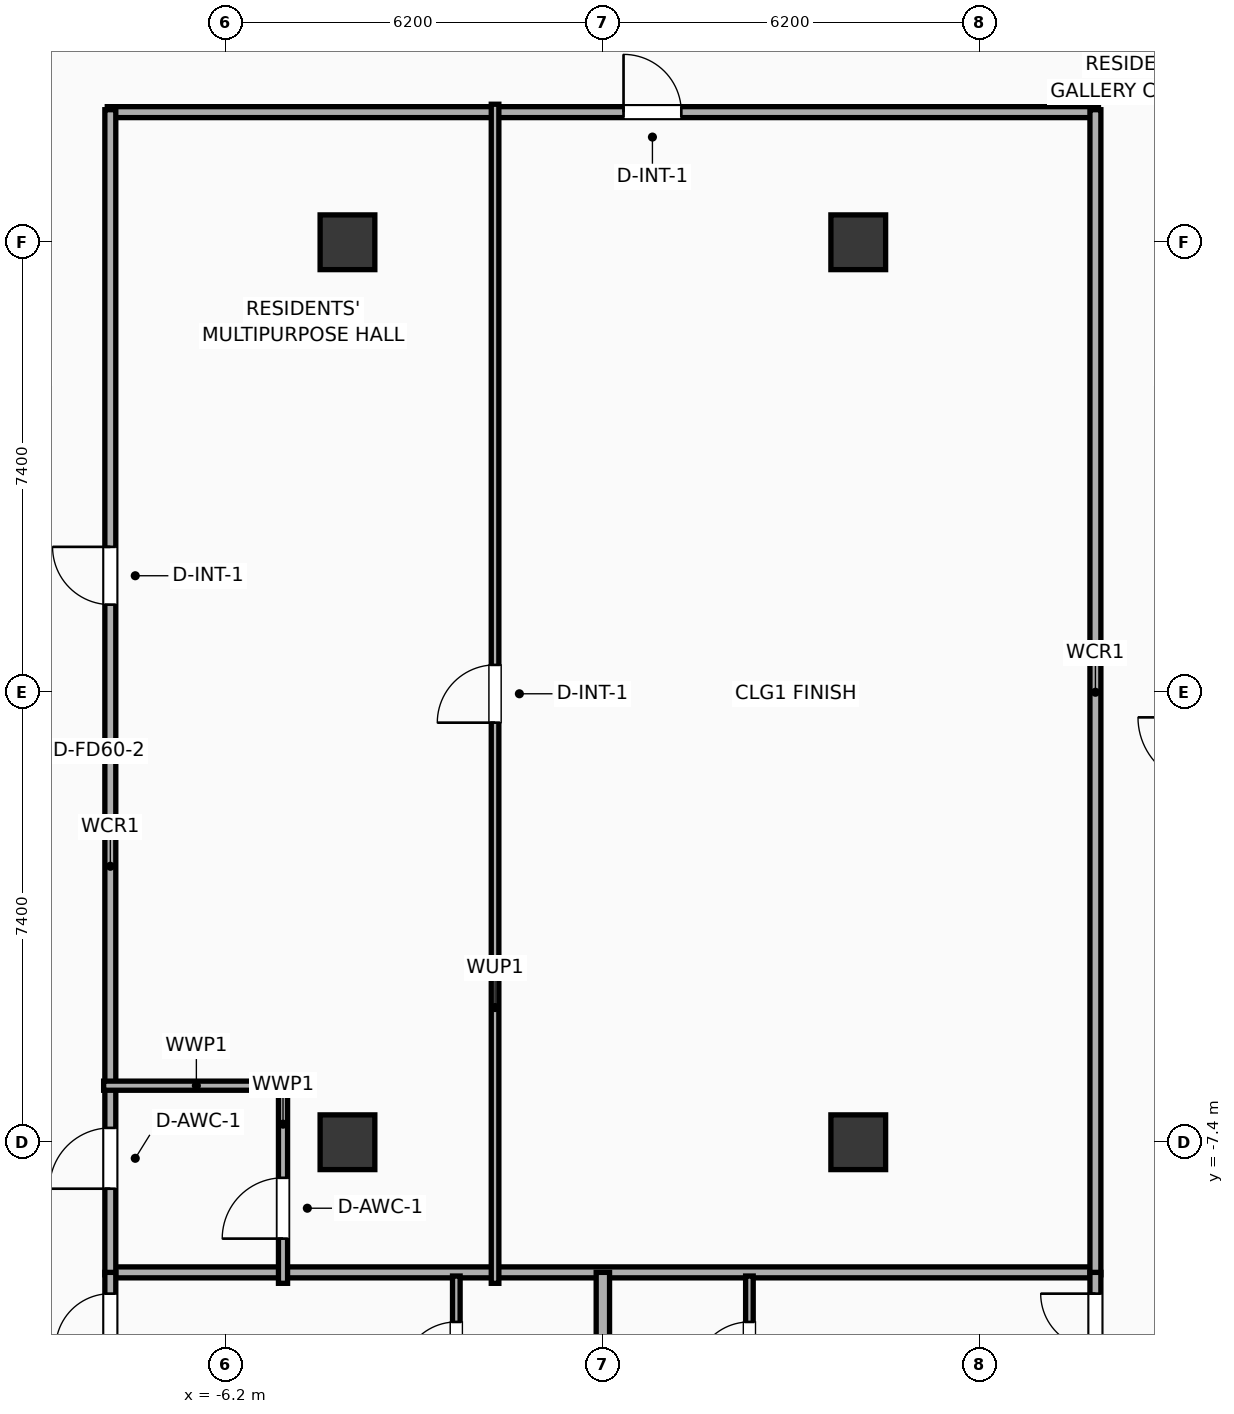
"""IFC4 building model, lengths in metres.
Left out: names, types, materials, properties, quantities, classifications, styles, units other than length and angle.
Written with IfcOpenShell. Run it as: python <this file> out.ifc"""

import sys

from ifc_helpers import new_model, si_unit, direction, frame, frame_2d, origin, origin_2d, place, context, subcontext, project, spatial, rectangle, extrude, element, fill, save


model = new_model("IFC4")
c1 = context("Model", 3, precision=1e-05, world=origin(), true_north=direction((0.0, 1.0)))
c2 = subcontext(c1, "Body", "Model", "MODEL_VIEW")
j1 = project(units=[si_unit("LENGTHUNIT", "METRE"), si_unit("PLANEANGLEUNIT", "RADIAN")], contexts=[c1])
p1 = place(None, origin())
s1 = spatial("IfcSite", under=j1, at=p1, CompositionType="ELEMENT")
p2 = place(p1, origin())
s2 = spatial("IfcBuilding", under=s1, at=p2, CompositionType="ELEMENT")
p3 = place(p2, frame((0.0, 0.0, 231.4)))
s3 = spatial("IfcBuildingStorey", under=s2, at=p3, CompositionType="ELEMENT", Elevation=231.4)
for number, where, z_axis, x_axis in (
    (1, (-4.2, -7.4, 0.0), (0.0, 0.0, 1.0), (1.0, 0.0, 0.0)),
    (2, (-4.2, 7.4, 0.0), (0.0, 0.0, 1.0), (1.0, 0.0, 0.0)),
    (3, (4.2, -7.4, 0.0), (0.0, 0.0, 1.0), (1.0, 0.0, 0.0)),
    (4, (4.2, 7.4, 0.0), (0.0, 0.0, 1.0), (1.0, 0.0, 0.0)),
):
    element("IfcColumn", number, at=place(p3, frame(where, z_axis=z_axis, x_axis=x_axis)), inside=s3, PredefinedType="COLUMN", context=c2, shape_type="SweptSolid", body=[
        extrude(rectangle(XDim=0.9, YDim=0.9, at=origin_2d()), origin(), (0.0, 0.0, 1.0), 3.9),
    ])
p4 = place(p3, frame((-8.15, 9.54, 0.0), z_axis=(0.0, 0.0, 1.0), x_axis=(1.0, 0.0, 0.0)))
e5 = element("IfcWall", 5, at=p4, inside=s3, PredefinedType="PARTITIONING", context=c2, shape_type="SweptSolid", body=[
    extrude(rectangle(XDim=16.3, YDim=0.18, at=frame_2d((8.15, 0.0))), origin(), (0.0, 0.0, 1.0), 3.65),
])
p5 = place(p4, frame((8.49, 0.0, 0.0)))
e6 = element("IfcOpeningElement", 6, at=p5, cuts=e5, PredefinedType="OPENING", context=c2, shape_type="SweptSolid", body=[
    extrude(rectangle(XDim=0.95, YDim=2.05, at=frame_2d((0.475, 1.025))), frame((0.0, 0.1, 0.0), z_axis=(0.0, -1.0, 0.0), x_axis=(1.0, 0.0, 0.0)), (0.0, 0.0, 1.0), 0.2),
])
p6 = place(p3, frame((-8.15, -9.54, 0.0), z_axis=(0.0, 0.0, 1.0), x_axis=(1.0, 0.0, 0.0)))
e7 = element("IfcWall", 7, at=p6, inside=s3, PredefinedType="PARTITIONING", context=c2, shape_type="SweptSolid", body=[
    extrude(rectangle(XDim=16.3, YDim=0.18, at=frame_2d((8.15, 0.0))), origin(), (0.0, 0.0, 1.0), 3.65),
])
p7 = place(p3, frame((-8.1, -9.58, 0.0), z_axis=(0.0, 0.0, 1.0), x_axis=(0.0, 1.0, 0.0)))
e8 = element("IfcWall", 8, at=p7, inside=s3, PredefinedType="PARTITIONING", context=c2, shape_type="SweptSolid", body=[
    extrude(rectangle(XDim=19.16, YDim=0.18, at=frame_2d((9.58, 0.0))), origin(), (0.0, 0.0, 1.0), 3.65),
])
p8 = place(p7, frame((1.416, 0.0, 0.0)))
e9 = element("IfcOpeningElement", 9, at=p8, cuts=e8, PredefinedType="OPENING", context=c2, shape_type="SweptSolid", body=[
    extrude(rectangle(XDim=1.0, YDim=2.05, at=frame_2d((0.5, 1.025))), frame((0.0, 0.1, 0.0), z_axis=(0.0, -1.0, 0.0), x_axis=(1.0, 0.0, 0.0)), (0.0, 0.0, 1.0), 0.2),
])
p9 = place(p7, frame((11.021, 0.0, 0.0)))
e10 = element("IfcOpeningElement", 10, at=p9, cuts=e8, PredefinedType="OPENING", context=c2, shape_type="SweptSolid", body=[
    extrude(rectangle(XDim=0.95, YDim=2.05, at=frame_2d((0.475, 1.025))), frame((0.0, 0.1, 0.0), z_axis=(0.0, -1.0, 0.0), x_axis=(1.0, 0.0, 0.0)), (0.0, 0.0, 1.0), 0.2),
])
p10 = place(p3, frame((8.1, -9.58, 0.0), z_axis=(0.0, 0.0, 1.0), x_axis=(0.0, 1.0, 0.0)))
e11 = element("IfcWall", 11, at=p10, inside=s3, PredefinedType="PARTITIONING", context=c2, shape_type="SweptSolid", body=[
    extrude(rectangle(XDim=19.16, YDim=0.18, at=frame_2d((9.58, 0.0))), origin(), (0.0, 0.0, 1.0), 3.65),
])
p11 = place(p3, frame((-5.26, -9.72, 0.0), z_axis=(0.0, 0.0, 1.0), x_axis=(0.0, 1.0, 0.0)))
e12 = element("IfcWall", 12, at=p11, inside=s3, PredefinedType="PLUMBINGWALL", context=c2, shape_type="SweptSolid", body=[
    extrude(rectangle(XDim=3.35, YDim=0.15, at=frame_2d((1.675, 0.0))), origin(), (0.0, 0.0, 1.0), 3.65),
])
p12 = place(p11, frame((0.735, 0.0, 0.0)))
e13 = element("IfcOpeningElement", 13, at=p12, cuts=e12, PredefinedType="OPENING", context=c2, shape_type="SweptSolid", body=[
    extrude(rectangle(XDim=1.0, YDim=2.05, at=frame_2d((0.5, 1.025))), frame((0.0, 0.085, 0.0), z_axis=(0.0, -1.0, 0.0), x_axis=(1.0, 0.0, 0.0)), (0.0, 0.0, 1.0), 0.17),
])
p13 = place(p3, frame((-8.21, -6.47, 0.0), z_axis=(0.0, 0.0, 1.0), x_axis=(1.0, 0.0, 0.0)))
e14 = element("IfcWall", 14, at=p13, inside=s3, PredefinedType="PLUMBINGWALL", context=c2, shape_type="SweptSolid", body=[
    extrude(rectangle(XDim=3.05, YDim=0.15, at=frame_2d((1.525, 0.0))), origin(), (0.0, 0.0, 1.0), 3.65),
])
p14 = place(p3, frame((-1.773, -9.72, 0.0), z_axis=(0.0, 0.0, 1.0), x_axis=(0.0, 1.0, 0.0)))
e15 = element("IfcWall", 15, at=p14, inside=s3, PredefinedType="PARTITIONING", context=c2, shape_type="SweptSolid", body=[
    extrude(rectangle(XDim=19.39, YDim=0.125, at=frame_2d((9.695, 0.0))), origin(), (0.0, 0.0, 1.0), 3.65),
])
p15 = place(p14, frame((9.22, 0.0, 0.0)))
e16 = element("IfcOpeningElement", 16, at=p15, cuts=e15, PredefinedType="OPENING", context=c2, shape_type="SweptSolid", body=[
    extrude(rectangle(XDim=0.95, YDim=2.05, at=frame_2d((0.475, 1.025))), frame((0.0, 0.073, 0.0), z_axis=(0.0, -1.0, 0.0), x_axis=(1.0, 0.0, 0.0)), (0.0, 0.0, 1.0), 0.145),
])
p16 = place(p3, frame((-2.41, -12.01, 0.0), z_axis=(0.0, 0.0, 1.0), x_axis=(0.0, 1.0, 0.0)))
e17 = element("IfcWall", 17, at=p16, inside=s3, PredefinedType="PARTITIONING", context=c2, shape_type="SweptSolid", body=[
    extrude(rectangle(XDim=2.41, YDim=0.125, at=frame_2d((1.205, 0.0))), origin(), (0.0, 0.0, 1.0), 3.65),
])
p17 = place(p16, frame((0.755, 0.0, 0.0)))
e18 = element("IfcOpeningElement", 18, at=p17, cuts=e17, PredefinedType="OPENING", context=c2, shape_type="SweptSolid", body=[
    extrude(rectangle(XDim=0.9, YDim=2.05, at=frame_2d((0.45, 1.025))), frame((0.0, 0.073, 0.0), z_axis=(0.0, -1.0, 0.0), x_axis=(1.0, 0.0, 0.0)), (0.0, 0.0, 1.0), 0.145),
])
p18 = place(p3, frame((-8.1, -18.83, 0.0), z_axis=(0.0, 0.0, 1.0), x_axis=(0.0, 1.0, 0.0)))
e19 = element("IfcWall", 19, at=p18, inside=s3, PredefinedType="PARTITIONING", context=c2, shape_type="SweptSolid", body=[
    extrude(rectangle(XDim=9.29, YDim=0.18, at=frame_2d((4.645, 0.0))), origin(), (0.0, 0.0, 1.0), 3.65),
])
p19 = place(p18, frame((8.04, 0.0, 0.0)))
e20 = element("IfcOpeningElement", 20, at=p19, cuts=e19, PredefinedType="OPENING", context=c2, shape_type="SweptSolid", body=[
    extrude(rectangle(XDim=0.9, YDim=2.05, at=frame_2d((0.45, 1.025))), frame((0.0, 0.1, 0.0), z_axis=(0.0, -1.0, 0.0), x_axis=(1.0, 0.0, 0.0)), (0.0, 0.0, 1.0), 0.2),
])
p20 = place(p3, frame((2.41, -12.01, 0.0), z_axis=(0.0, 0.0, 1.0), x_axis=(0.0, 1.0, 0.0)))
e21 = element("IfcWall", 21, at=p20, inside=s3, PredefinedType="PARTITIONING", context=c2, shape_type="SweptSolid", body=[
    extrude(rectangle(XDim=2.41, YDim=0.125, at=frame_2d((1.205, 0.0))), origin(), (0.0, 0.0, 1.0), 3.65),
])
p21 = place(p20, frame((0.755, 0.0, 0.0)))
e22 = element("IfcOpeningElement", 22, at=p21, cuts=e21, PredefinedType="OPENING", context=c2, shape_type="SweptSolid", body=[
    extrude(rectangle(XDim=0.9, YDim=2.05, at=frame_2d((0.45, 1.025))), frame((0.0, 0.073, 0.0), z_axis=(0.0, -1.0, 0.0), x_axis=(1.0, 0.0, 0.0)), (0.0, 0.0, 1.0), 0.145),
])
p22 = place(p3, frame((8.1, -18.83, 0.0), z_axis=(0.0, 0.0, 1.0), x_axis=(0.0, 1.0, 0.0)))
e23 = element("IfcWall", 23, at=p22, inside=s3, PredefinedType="PARTITIONING", context=c2, shape_type="SweptSolid", body=[
    extrude(rectangle(XDim=9.29, YDim=0.18, at=frame_2d((4.645, 0.0))), origin(), (0.0, 0.0, 1.0), 3.65),
])
p23 = place(p22, frame((8.04, 0.0, 0.0)))
e24 = element("IfcOpeningElement", 24, at=p23, cuts=e23, PredefinedType="OPENING", context=c2, shape_type="SweptSolid", body=[
    extrude(rectangle(XDim=0.9, YDim=2.05, at=frame_2d((0.45, 1.025))), frame((0.0, 0.1, 0.0), z_axis=(0.0, -1.0, 0.0), x_axis=(1.0, 0.0, 0.0)), (0.0, 0.0, 1.0), 0.2),
])
p24 = place(p3, frame((0.0, -18.83, 0.0), z_axis=(0.0, 0.0, 1.0), x_axis=(0.0, 1.0, 0.0)))
e25 = element("IfcWall", 25, at=p24, inside=s3, PredefinedType="PARTITIONING", context=c2, shape_type="SweptSolid", body=[
    extrude(rectangle(XDim=9.29, YDim=0.22, at=frame_2d((4.645, 0.0))), origin(), (0.0, 0.0, 1.0), 3.65),
])
p25 = place(p5, origin())
e26 = element("IfcDoor", 26, at=p25, inside=s3, OperationType="SINGLE_SWING_LEFT", PredefinedType="DOOR", context=c2, shape_type="SweptSolid", body=[
    extrude(rectangle(XDim=0.95, YDim=2.05, at=frame_2d((0.475, 1.025))), frame((0.0, 0.025, 0.0), z_axis=(0.0, -1.0, 0.0), x_axis=(1.0, 0.0, 0.0)), (0.0, 0.0, 1.0), 0.05),
])
fill(e6, e26)
p26 = place(p8, origin())
e27 = element("IfcDoor", 27, at=p26, inside=s3, OperationType="SINGLE_SWING_LEFT", PredefinedType="DOOR", context=c2, shape_type="SweptSolid", body=[
    extrude(rectangle(XDim=1.0, YDim=2.05, at=frame_2d((0.5, 1.025))), frame((0.0, 0.025, 0.0), z_axis=(0.0, -1.0, 0.0), x_axis=(1.0, 0.0, 0.0)), (0.0, 0.0, 1.0), 0.05),
])
fill(e9, e27)
p27 = place(p9, origin())
e28 = element("IfcDoor", 28, at=p27, inside=s3, OperationType="SINGLE_SWING_RIGHT", PredefinedType="DOOR", context=c2, shape_type="SweptSolid", body=[
    extrude(rectangle(XDim=0.95, YDim=2.05, at=frame_2d((0.475, 1.025))), frame((0.0, 0.025, 0.0), z_axis=(0.0, -1.0, 0.0), x_axis=(1.0, 0.0, 0.0)), (0.0, 0.0, 1.0), 0.05),
])
fill(e10, e28)
p28 = place(p12, origin())
e29 = element("IfcDoor", 29, at=p28, inside=s3, OperationType="SINGLE_SWING_LEFT", PredefinedType="DOOR", context=c2, shape_type="SweptSolid", body=[
    extrude(rectangle(XDim=1.0, YDim=2.05, at=frame_2d((0.5, 1.025))), frame((0.0, 0.025, 0.0), z_axis=(0.0, -1.0, 0.0), x_axis=(1.0, 0.0, 0.0)), (0.0, 0.0, 1.0), 0.05),
])
fill(e13, e29)
p29 = place(p15, origin())
e30 = element("IfcDoor", 30, at=p29, inside=s3, OperationType="SINGLE_SWING_LEFT", PredefinedType="DOOR", context=c2, shape_type="SweptSolid", body=[
    extrude(rectangle(XDim=0.95, YDim=2.05, at=frame_2d((0.475, 1.025))), frame((0.0, 0.025, 0.0), z_axis=(0.0, -1.0, 0.0), x_axis=(1.0, 0.0, 0.0)), (0.0, 0.0, 1.0), 0.05),
])
fill(e16, e30)
p30 = place(p17, origin())
e31 = element("IfcDoor", 31, at=p30, inside=s3, OperationType="SINGLE_SWING_LEFT", PredefinedType="DOOR", context=c2, shape_type="SweptSolid", body=[
    extrude(rectangle(XDim=0.9, YDim=2.05, at=frame_2d((0.45, 1.025))), frame((0.0, 0.025, 0.0), z_axis=(0.0, -1.0, 0.0), x_axis=(1.0, 0.0, 0.0)), (0.0, 0.0, 1.0), 0.05),
])
fill(e18, e31)
p31 = place(p19, origin())
e32 = element("IfcDoor", 32, at=p31, inside=s3, OperationType="SINGLE_SWING_LEFT", PredefinedType="DOOR", context=c2, shape_type="SweptSolid", body=[
    extrude(rectangle(XDim=0.9, YDim=2.05, at=frame_2d((0.45, 1.025))), frame((0.0, 0.025, 0.0), z_axis=(0.0, -1.0, 0.0), x_axis=(1.0, 0.0, 0.0)), (0.0, 0.0, 1.0), 0.05),
])
fill(e20, e32)
p32 = place(p21, origin())
e33 = element("IfcDoor", 33, at=p32, inside=s3, OperationType="SINGLE_SWING_LEFT", PredefinedType="DOOR", context=c2, shape_type="SweptSolid", body=[
    extrude(rectangle(XDim=0.9, YDim=2.05, at=frame_2d((0.45, 1.025))), frame((0.0, 0.025, 0.0), z_axis=(0.0, -1.0, 0.0), x_axis=(1.0, 0.0, 0.0)), (0.0, 0.0, 1.0), 0.05),
])
fill(e22, e33)
p33 = place(p23, origin())
e34 = element("IfcDoor", 34, at=p33, inside=s3, OperationType="SINGLE_SWING_RIGHT", PredefinedType="DOOR", context=c2, shape_type="SweptSolid", body=[
    extrude(rectangle(XDim=0.9, YDim=2.05, at=frame_2d((0.45, 1.025))), frame((0.0, 0.025, 0.0), z_axis=(0.0, -1.0, 0.0), x_axis=(1.0, 0.0, 0.0)), (0.0, 0.0, 1.0), 0.05),
])
fill(e24, e34)
save(model, sys.argv[1])
